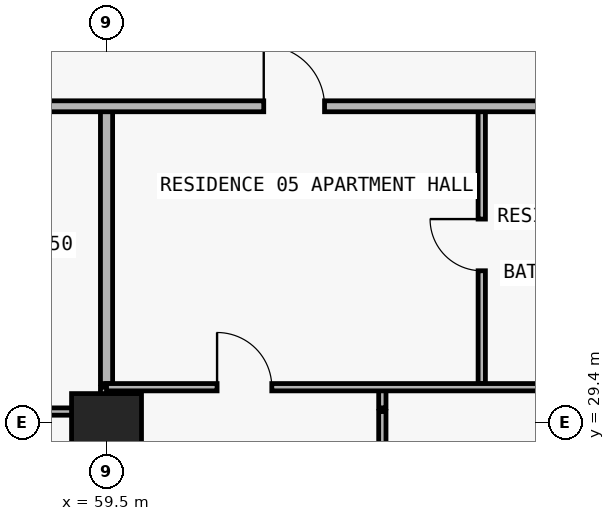
"""IFC4 building model, lengths in metres.
Left out: names, types, materials, properties, quantities, classifications, styles, units other than length and angle.
Written with IfcOpenShell. Run it as: python <this file> out.ifc"""

import sys

from ifc_helpers import new_model, si_unit, direction, frame, frame_2d, origin, origin_2d, place, context, subcontext, project, spatial, rectangle, extrude, element, fill, save


model = new_model("IFC4")
c1 = context("Model", 3, precision=1e-05, world=origin(), true_north=direction((0.0, 1.0)))
c2 = subcontext(c1, "Body", "Model", "MODEL_VIEW")
j1 = project(units=[si_unit("LENGTHUNIT", "METRE"), si_unit("PLANEANGLEUNIT", "RADIAN")], contexts=[c1])
p1 = place(None, origin())
s1 = spatial("IfcSite", under=j1, at=p1, CompositionType="ELEMENT")
p2 = place(p1, origin())
s2 = spatial("IfcBuilding", under=s1, at=p2, CompositionType="ELEMENT")
p3 = place(p2, frame((0.0, 0.0, 53.1)))
s3 = spatial("IfcBuildingStorey", under=s2, at=p3, CompositionType="ELEMENT", Elevation=53.1)
p4 = place(p3, frame((59.5, 29.4, 0.0), z_axis=(0.0, 0.0, 1.0), x_axis=(1.0, 0.0, 0.0)))
e1 = element("IfcColumn", 1, at=p4, inside=s3, PredefinedType="COLUMN", context=c2, shape_type="SweptSolid", body=[
    extrude(rectangle(XDim=1.15, YDim=0.95, at=origin_2d()), origin(), (0.0, 0.0, 1.0), 3.05),
])
p5 = place(p3, frame((59.5, 24.89, 0.0), z_axis=(0.0, 0.0, 1.0), x_axis=(0.0, 1.0, 0.0)))
e2 = element("IfcWall", 2, at=p5, inside=s3, PredefinedType="PARTITIONING", context=c2, shape_type="SweptSolid", body=[
    extrude(rectangle(XDim=4.69, YDim=0.2, at=frame_2d((2.345, 0.0))), origin(), (0.0, 0.0, 1.0), 2.11),
])
p6 = place(p3, frame((59.5, 29.64, 0.0), z_axis=(0.0, 0.0, 1.0), x_axis=(0.0, 1.0, 0.0)))
e3 = element("IfcWall", 3, at=p6, inside=s3, PredefinedType="PARTITIONING", context=c2, shape_type="SweptSolid", body=[
    extrude(rectangle(XDim=0.34, YDim=0.2, at=frame_2d((0.17, 0.0))), origin(), (0.0, 0.0, 1.0), 2.11),
])
p7 = place(p3, frame((59.5, 30.04, 0.0), z_axis=(0.0, 0.0, 1.0), x_axis=(0.0, 1.0, 0.0)))
e4 = element("IfcWall", 4, at=p7, inside=s3, PredefinedType="PARTITIONING", context=c2, shape_type="SweptSolid", body=[
    extrude(rectangle(XDim=4.56, YDim=0.2, at=frame_2d((2.28, 0.0))), origin(), (0.0, 0.0, 1.0), 2.11),
])
p8 = place(p3, frame((64.036, 24.89, 0.0), z_axis=(0.0, 0.0, 1.0), x_axis=(0.0, 1.0, 0.0)))
e5 = element("IfcWall", 5, at=p8, inside=s3, PredefinedType="PARTITIONING", context=c2, shape_type="SweptSolid", body=[
    extrude(rectangle(XDim=4.69, YDim=0.12, at=frame_2d((2.345, 0.0))), origin(), (0.0, 0.0, 1.0), 3.05),
])
p9 = place(p8, frame((1.895, 0.0, 0.0)))
e6 = element("IfcOpeningElement", 6, at=p9, cuts=e5, PredefinedType="OPENING", context=c2, shape_type="SweptSolid", body=[
    extrude(rectangle(XDim=0.9, YDim=2.15, at=frame_2d((0.45, 1.075))), frame((0.0, 0.07, 0.0), z_axis=(0.0, -1.0, 0.0), x_axis=(1.0, 0.0, 0.0)), (0.0, 0.0, 1.0), 0.14),
])
p10 = place(p3, frame((64.036, 29.64, 0.0), z_axis=(0.0, 0.0, 1.0), x_axis=(0.0, 1.0, 0.0)))
e7 = element("IfcWall", 7, at=p10, inside=s3, PredefinedType="PARTITIONING", context=c2, shape_type="SweptSolid", body=[
    extrude(rectangle(XDim=0.34, YDim=0.12, at=frame_2d((0.17, 0.0))), origin(), (0.0, 0.0, 1.0), 3.05),
])
p11 = place(p3, frame((65.671, 30.04, 0.0), z_axis=(0.0, 0.0, 1.0), x_axis=(0.0, 1.0, 0.0)))
e8 = element("IfcWall", 8, at=p11, inside=s3, PredefinedType="PARTITIONING", context=c2, shape_type="SweptSolid", body=[
    extrude(rectangle(XDim=4.56, YDim=0.12, at=frame_2d((2.28, 0.0))), origin(), (0.0, 0.0, 1.0), 2.578),
])
p12 = place(p11, frame((1.855, 0.0, 0.0)))
e9 = element("IfcOpeningElement", 9, at=p12, cuts=e8, PredefinedType="OPENING", context=c2, shape_type="SweptSolid", body=[
    extrude(rectangle(XDim=0.85, YDim=2.1, at=frame_2d((0.425, 1.05))), frame((0.0, 0.07, 0.0), z_axis=(0.0, -1.0, 0.0), x_axis=(1.0, 0.0, 0.0)), (0.0, 0.0, 1.0), 0.14),
])
p13 = place(p3, frame((51.1, 29.58, 0.0), z_axis=(0.0, 0.0, 1.0), x_axis=(1.0, 0.0, 0.0)))
e10 = element("IfcWall", 10, at=p13, inside=s3, PredefinedType="PARTITIONING", context=c2, shape_type="SweptSolid", body=[
    extrude(rectangle(XDim=8.4, YDim=0.12, at=frame_2d((4.2, 0.0))), origin(), (0.0, 0.0, 1.0), 2.11),
])
p14 = place(p13, frame((1.693, 0.0, 0.0)))
e11 = element("IfcOpeningElement", 11, at=p14, cuts=e10, PredefinedType="OPENING", context=c2, shape_type="SweptSolid", body=[
    extrude(rectangle(XDim=0.9, YDim=2.06, at=frame_2d((0.45, 1.03))), frame((0.0, 0.07, 0.0), z_axis=(0.0, -1.0, 0.0), x_axis=(1.0, 0.0, 0.0)), (0.0, 0.0, 1.0), 0.14),
])
p15 = place(p3, frame((59.5, 29.98, 0.0), z_axis=(0.0, 0.0, 1.0), x_axis=(1.0, 0.0, 0.0)))
e12 = element("IfcWall", 12, at=p15, inside=s3, PredefinedType="PARTITIONING", context=c2, shape_type="SweptSolid", body=[
    extrude(rectangle(XDim=8.4, YDim=0.12, at=frame_2d((4.2, 0.0))), origin(), (0.0, 0.0, 1.0), 3.05),
])
p16 = place(p15, frame((1.818, 0.0, 0.0)))
e13 = element("IfcOpeningElement", 13, at=p16, cuts=e12, PredefinedType="OPENING", context=c2, shape_type="SweptSolid", body=[
    extrude(rectangle(XDim=0.9, YDim=2.15, at=frame_2d((0.45, 1.075))), frame((0.0, 0.07, 0.0), z_axis=(0.0, -1.0, 0.0), x_axis=(1.0, 0.0, 0.0)), (0.0, 0.0, 1.0), 0.14),
])
p17 = place(p3, frame((5.105, 34.6, 0.0), z_axis=(0.0, 0.0, 1.0), x_axis=(1.0, 0.0, 0.0)))
e14 = element("IfcWall", 14, at=p17, inside=s3, PredefinedType="PARTITIONING", context=c2, shape_type="SweptSolid", body=[
    extrude(rectangle(XDim=67.595, YDim=0.18, at=frame_2d((33.797, 0.0))), origin(), (0.0, 0.0, 1.0), 3.05),
])
p18 = place(p17, frame((7.365, 0.0, 0.0)))
e15 = element("IfcOpeningElement", 15, at=p18, cuts=e14, PredefinedType="OPENING", context=c2, shape_type="SweptSolid", body=[
    extrude(rectangle(XDim=1.0, YDim=2.2, at=frame_2d((0.5, 1.1))), frame((0.0, 0.1, 0.0), z_axis=(0.0, -1.0, 0.0), x_axis=(1.0, 0.0, 0.0)), (0.0, 0.0, 1.0), 0.2),
])
p19 = place(p17, frame((15.927, 0.0, 0.0)))
e16 = element("IfcOpeningElement", 16, at=p19, cuts=e14, PredefinedType="OPENING", context=c2, shape_type="SweptSolid", body=[
    extrude(rectangle(XDim=1.0, YDim=2.2, at=frame_2d((0.5, 1.1))), frame((0.0, 0.1, 0.0), z_axis=(0.0, -1.0, 0.0), x_axis=(1.0, 0.0, 0.0)), (0.0, 0.0, 1.0), 0.2),
])
p20 = place(p17, frame((24.407, 0.0, 0.0)))
e17 = element("IfcOpeningElement", 17, at=p20, cuts=e14, PredefinedType="OPENING", context=c2, shape_type="SweptSolid", body=[
    extrude(rectangle(XDim=1.0, YDim=2.2, at=frame_2d((0.5, 1.1))), frame((0.0, 0.1, 0.0), z_axis=(0.0, -1.0, 0.0), x_axis=(1.0, 0.0, 0.0)), (0.0, 0.0, 1.0), 0.2),
])
p21 = place(p17, frame((48.739, 0.0, 0.0)))
e18 = element("IfcOpeningElement", 18, at=p21, cuts=e14, PredefinedType="OPENING", context=c2, shape_type="SweptSolid", body=[
    extrude(rectangle(XDim=1.0, YDim=2.2, at=frame_2d((0.5, 1.1))), frame((0.0, 0.1, 0.0), z_axis=(0.0, -1.0, 0.0), x_axis=(1.0, 0.0, 0.0)), (0.0, 0.0, 1.0), 0.2),
])
p22 = place(p17, frame((56.98, 0.0, 0.0)))
e19 = element("IfcOpeningElement", 19, at=p22, cuts=e14, PredefinedType="OPENING", context=c2, shape_type="SweptSolid", body=[
    extrude(rectangle(XDim=1.0, YDim=2.2, at=frame_2d((0.5, 1.1))), frame((0.0, 0.1, 0.0), z_axis=(0.0, -1.0, 0.0), x_axis=(1.0, 0.0, 0.0)), (0.0, 0.0, 1.0), 0.2),
])
p23 = place(p22, origin())
e20 = element("IfcDoor", 20, at=p23, inside=s3, OperationType="SINGLE_SWING_LEFT", PredefinedType="DOOR", context=c2, shape_type="SweptSolid", body=[
    extrude(rectangle(XDim=1.0, YDim=2.2, at=frame_2d((0.5, 1.1))), frame((0.0, 0.025, 0.0), z_axis=(0.0, -1.0, 0.0), x_axis=(1.0, 0.0, 0.0)), (0.0, 0.0, 1.0), 0.05),
])
fill(e19, e20)
p24 = place(p12, origin())
e21 = element("IfcDoor", 21, at=p24, inside=s3, OperationType="SINGLE_SWING_RIGHT", PredefinedType="DOOR", context=c2, shape_type="SweptSolid", body=[
    extrude(rectangle(XDim=0.85, YDim=2.1, at=frame_2d((0.425, 1.05))), frame((0.0, 0.025, 0.0), z_axis=(0.0, -1.0, 0.0), x_axis=(1.0, 0.0, 0.0)), (0.0, 0.0, 1.0), 0.05),
])
fill(e9, e21)
p25 = place(p16, origin())
e22 = element("IfcDoor", 22, at=p25, inside=s3, OperationType="SINGLE_SWING_LEFT", PredefinedType="DOOR", context=c2, shape_type="SweptSolid", body=[
    extrude(rectangle(XDim=0.9, YDim=2.15, at=frame_2d((0.45, 1.075))), frame((0.0, 0.025, 0.0), z_axis=(0.0, -1.0, 0.0), x_axis=(1.0, 0.0, 0.0)), (0.0, 0.0, 1.0), 0.05),
])
fill(e13, e22)
save(model, sys.argv[1])
